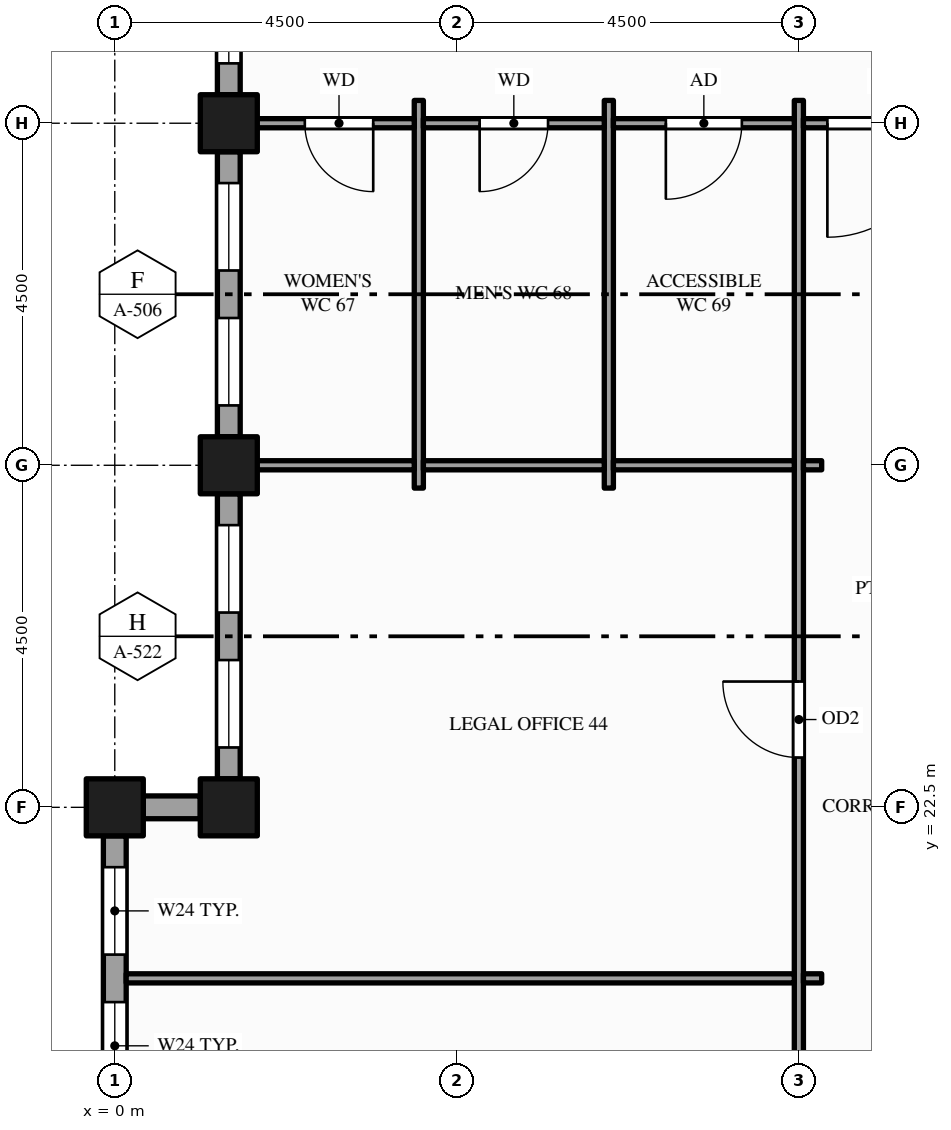
"""IFC4 building model, lengths in metres.
Left out: names, types, materials, properties, quantities, classifications, styles, units other than length and angle.
Written with IfcOpenShell. Run it as: python <this file> out.ifc"""

import sys

from ifc_helpers import new_model, si_unit, direction, frame, frame_2d, origin, origin_2d, place, context, subcontext, project, spatial, rectangle, hollow_rectangle, extrude, element, fill, save


model = new_model("IFC4")
c1 = context("Model", 3, precision=1e-05, world=origin(), true_north=direction((0.0, 1.0)))
c2 = subcontext(c1, "Body", "Model", "MODEL_VIEW")
j1 = project(units=[si_unit("LENGTHUNIT", "METRE"), si_unit("PLANEANGLEUNIT", "RADIAN")], contexts=[c1])
p1 = place(None, origin())
s1 = spatial("IfcSite", under=j1, at=p1, CompositionType="ELEMENT")
p2 = place(p1, origin())
s2 = spatial("IfcBuilding", under=s1, at=p2, CompositionType="ELEMENT")
p3 = place(p2, frame((0.0, 0.0, 239.0)))
s3 = spatial("IfcBuildingStorey", under=s2, at=p3, CompositionType="ELEMENT", Elevation=239.0)
for number, where, z_axis, x_axis in (
    (1, (0.0, 22.5, -0.15), (0.0, 0.0, 1.0), (1.0, 0.0, 0.0)),
    (2, (1.5, 22.5, -0.15), (0.0, 0.0, 1.0), (1.0, 0.0, 0.0)),
    (3, (1.5, 27.0, -0.15), (0.0, 0.0, 1.0), (1.0, 0.0, 0.0)),
    (4, (1.5, 31.5, -0.15), (0.0, 0.0, 1.0), (1.0, 0.0, 0.0)),
):
    element("IfcColumn", number, at=place(p3, frame(where, z_axis=z_axis, x_axis=x_axis)), inside=s3, PredefinedType="COLUMN", context=c2, shape_type="SweptSolid", body=[
        extrude(hollow_rectangle(XDim=0.75, YDim=0.75, WallThickness=0.036, at=origin_2d()), origin(), (0.0, 0.0, 1.0), 3.85),
    ])
p4 = place(p3, frame((1.5, 36.0, 0.0), z_axis=(0.0, 0.0, 1.0), x_axis=(0.0, -1.0, 0.0)))
e5 = element("IfcWall", 5, at=p4, inside=s3, PredefinedType="STANDARD", context=c2, shape_type="SweptSolid", body=[
    extrude(rectangle(XDim=4.125, YDim=0.3, at=frame_2d((2.062, 0.0))), origin(), (0.0, 0.0, 1.0), 3.007),
])
p5 = place(p4, frame((0.4, 0.0, 0.9)))
e6 = element("IfcOpeningElement", 6, at=p5, cuts=e5, PredefinedType="OPENING", context=c2, shape_type="SweptSolid", body=[
    extrude(rectangle(XDim=1.55, YDim=1.75, at=frame_2d((0.775, 0.875))), frame((0.0, 0.16, 0.0), z_axis=(0.0, -1.0, 0.0), x_axis=(1.0, 0.0, 0.0)), (0.0, 0.0, 1.0), 0.32),
])
p6 = place(p4, frame((2.562, 0.0, 0.9)))
e7 = element("IfcOpeningElement", 7, at=p6, cuts=e5, PredefinedType="OPENING", context=c2, shape_type="SweptSolid", body=[
    extrude(rectangle(XDim=1.15, YDim=1.75, at=frame_2d((0.575, 0.875))), frame((0.0, 0.16, 0.0), z_axis=(0.0, -1.0, 0.0), x_axis=(1.0, 0.0, 0.0)), (0.0, 0.0, 1.0), 0.32),
])
p7 = place(p3, frame((1.5, 31.125, 0.0), z_axis=(0.0, 0.0, 1.0), x_axis=(0.0, -1.0, 0.0)))
e8 = element("IfcWall", 8, at=p7, inside=s3, PredefinedType="STANDARD", context=c2, shape_type="SweptSolid", body=[
    extrude(rectangle(XDim=3.75, YDim=0.3, at=frame_2d((1.875, 0.0))), origin(), (0.0, 0.0, 1.0), 3.007),
])
p8 = place(p7, frame((0.413, 0.0, 0.9)))
e9 = element("IfcOpeningElement", 9, at=p8, cuts=e8, PredefinedType="OPENING", context=c2, shape_type="SweptSolid", body=[
    extrude(rectangle(XDim=1.15, YDim=1.75, at=frame_2d((0.575, 0.875))), frame((0.0, 0.16, 0.0), z_axis=(0.0, -1.0, 0.0), x_axis=(1.0, 0.0, 0.0)), (0.0, 0.0, 1.0), 0.32),
])
p9 = place(p7, frame((2.188, 0.0, 0.9)))
e10 = element("IfcOpeningElement", 10, at=p9, cuts=e8, PredefinedType="OPENING", context=c2, shape_type="SweptSolid", body=[
    extrude(rectangle(XDim=1.15, YDim=1.75, at=frame_2d((0.575, 0.875))), frame((0.0, 0.16, 0.0), z_axis=(0.0, -1.0, 0.0), x_axis=(1.0, 0.0, 0.0)), (0.0, 0.0, 1.0), 0.32),
])
p10 = place(p3, frame((1.5, 26.625, 0.0), z_axis=(0.0, 0.0, 1.0), x_axis=(0.0, -1.0, 0.0)))
e11 = element("IfcWall", 11, at=p10, inside=s3, PredefinedType="STANDARD", context=c2, shape_type="SweptSolid", body=[
    extrude(rectangle(XDim=3.75, YDim=0.3, at=frame_2d((1.875, 0.0))), origin(), (0.0, 0.0, 1.0), 3.007),
])
p11 = place(p10, frame((0.413, 0.0, 0.9)))
e12 = element("IfcOpeningElement", 12, at=p11, cuts=e11, PredefinedType="OPENING", context=c2, shape_type="SweptSolid", body=[
    extrude(rectangle(XDim=1.15, YDim=1.75, at=frame_2d((0.575, 0.875))), frame((0.0, 0.16, 0.0), z_axis=(0.0, -1.0, 0.0), x_axis=(1.0, 0.0, 0.0)), (0.0, 0.0, 1.0), 0.32),
])
p12 = place(p10, frame((2.188, 0.0, 0.9)))
e13 = element("IfcOpeningElement", 13, at=p12, cuts=e11, PredefinedType="OPENING", context=c2, shape_type="SweptSolid", body=[
    extrude(rectangle(XDim=1.15, YDim=1.75, at=frame_2d((0.575, 0.875))), frame((0.0, 0.16, 0.0), z_axis=(0.0, -1.0, 0.0), x_axis=(1.0, 0.0, 0.0)), (0.0, 0.0, 1.0), 0.32),
])
p13 = place(p3, frame((1.125, 22.5, 0.0), z_axis=(0.0, 0.0, 1.0), x_axis=(-1.0, 0.0, 0.0)))
e14 = element("IfcWall", 14, at=p13, inside=s3, PredefinedType="STANDARD", context=c2, shape_type="SweptSolid", body=[
    extrude(rectangle(XDim=0.75, YDim=0.3, at=frame_2d((0.375, 0.0))), origin(), (0.0, 0.0, 1.0), 3.057),
])
p14 = place(p3, frame((0.0, 22.125, 0.0), z_axis=(0.0, 0.0, 1.0), x_axis=(0.0, -1.0, 0.0)))
e15 = element("IfcWall", 15, at=p14, inside=s3, PredefinedType="STANDARD", context=c2, shape_type="SweptSolid", body=[
    extrude(rectangle(XDim=3.75, YDim=0.3, at=frame_2d((1.875, 0.0))), origin(), (0.0, 0.0, 1.0), 3.057),
])
p15 = place(p14, frame((0.413, 0.0, 0.9)))
e16 = element("IfcOpeningElement", 16, at=p15, cuts=e15, PredefinedType="OPENING", context=c2, shape_type="SweptSolid", body=[
    extrude(rectangle(XDim=1.15, YDim=2.0, at=frame_2d((0.575, 1.0))), frame((0.0, 0.16, 0.0), z_axis=(0.0, -1.0, 0.0), x_axis=(1.0, 0.0, 0.0)), (0.0, 0.0, 1.0), 0.32),
])
p16 = place(p14, frame((2.188, 0.0, 0.9)))
e17 = element("IfcOpeningElement", 17, at=p16, cuts=e15, PredefinedType="OPENING", context=c2, shape_type="SweptSolid", body=[
    extrude(rectangle(XDim=1.15, YDim=2.0, at=frame_2d((0.575, 1.0))), frame((0.0, 0.16, 0.0), z_axis=(0.0, -1.0, 0.0), x_axis=(1.0, 0.0, 0.0)), (0.0, 0.0, 1.0), 0.32),
])
for number, where, z_axis, x_axis in (
    (18, (4.0, 26.7, 0.0), (0.0, 0.0, 1.0), (0.0, 1.0, 0.0)),
    (19, (6.5, 26.7, 0.0), (0.0, 0.0, 1.0), (0.0, 1.0, 0.0)),
):
    element("IfcWall", number, at=place(p3, frame(where, z_axis=z_axis, x_axis=x_axis)), inside=s3, PredefinedType="PARTITIONING", context=c2, shape_type="SweptSolid", body=[
        extrude(rectangle(XDim=5.1, YDim=0.12, at=frame_2d((2.55, 0.0))), origin(), (0.0, 0.0, 1.0), 3.7),
    ])
p17 = place(p3, frame((9.0, 13.2, 0.0), z_axis=(0.0, 0.0, 1.0), x_axis=(0.0, 1.0, 0.0)))
e20 = element("IfcWall", 20, at=p17, inside=s3, PredefinedType="PARTITIONING", context=c2, shape_type="SweptSolid", body=[
    extrude(rectangle(XDim=18.6, YDim=0.12, at=frame_2d((9.3, 0.0))), origin(), (0.0, 0.0, 1.0), 2.72),
])
p18 = place(p17, frame((3.175, 0.0, 0.0)))
e21 = element("IfcOpeningElement", 21, at=p18, cuts=e20, PredefinedType="OPENING", context=c2, shape_type="SweptSolid", body=[
    extrude(rectangle(XDim=1.0, YDim=2.1, at=frame_2d((0.5, 1.05))), frame((0.0, 0.07, 0.0), z_axis=(0.0, -1.0, 0.0), x_axis=(1.0, 0.0, 0.0)), (0.0, 0.0, 1.0), 0.14),
])
p19 = place(p17, frame((9.955, 0.0, 0.0)))
e22 = element("IfcOpeningElement", 22, at=p19, cuts=e20, PredefinedType="OPENING", context=c2, shape_type="SweptSolid", body=[
    extrude(rectangle(XDim=1.0, YDim=2.1, at=frame_2d((0.5, 1.05))), frame((0.0, 0.07, 0.0), z_axis=(0.0, -1.0, 0.0), x_axis=(1.0, 0.0, 0.0)), (0.0, 0.0, 1.0), 0.14),
])
p20 = place(p3, frame((0.15, 20.25, 0.0), z_axis=(0.0, 0.0, 1.0), x_axis=(1.0, 0.0, 0.0)))
e23 = element("IfcWall", 23, at=p20, inside=s3, PredefinedType="PARTITIONING", context=c2, shape_type="SweptSolid", body=[
    extrude(rectangle(XDim=8.79, YDim=0.12, at=frame_2d((4.395, 0.0))), origin(), (0.0, 0.0, 1.0), 2.77),
])
p21 = place(p3, frame((9.06, 20.25, 0.0), z_axis=(0.0, 0.0, 1.0), x_axis=(1.0, 0.0, 0.0)))
e24 = element("IfcWall", 24, at=p21, inside=s3, PredefinedType="PARTITIONING", context=c2, shape_type="SweptSolid", body=[
    extrude(rectangle(XDim=0.24, YDim=0.12, at=frame_2d((0.12, 0.0))), origin(), (0.0, 0.0, 1.0), 2.77),
])
p22 = place(p3, frame((1.65, 27.0, 0.0), z_axis=(0.0, 0.0, 1.0), x_axis=(1.0, 0.0, 0.0)))
e25 = element("IfcWall", 25, at=p22, inside=s3, PredefinedType="PARTITIONING", context=c2, shape_type="SweptSolid", body=[
    extrude(rectangle(XDim=2.29, YDim=0.12, at=frame_2d((1.145, 0.0))), origin(), (0.0, 0.0, 1.0), 2.72),
])
for number, where, z_axis, x_axis in (
    (26, (4.06, 27.0, 0.0), (0.0, 0.0, 1.0), (1.0, 0.0, 0.0)),
    (27, (6.56, 27.0, 0.0), (0.0, 0.0, 1.0), (1.0, 0.0, 0.0)),
):
    element("IfcWall", number, at=place(p3, frame(where, z_axis=z_axis, x_axis=x_axis)), inside=s3, PredefinedType="PARTITIONING", context=c2, shape_type="SweptSolid", body=[
        extrude(rectangle(XDim=2.38, YDim=0.12, at=frame_2d((1.19, 0.0))), origin(), (0.0, 0.0, 1.0), 2.72),
    ])
p23 = place(p3, frame((9.06, 27.0, 0.0), z_axis=(0.0, 0.0, 1.0), x_axis=(1.0, 0.0, 0.0)))
e28 = element("IfcWall", 28, at=p23, inside=s3, PredefinedType="PARTITIONING", context=c2, shape_type="SweptSolid", body=[
    extrude(rectangle(XDim=0.24, YDim=0.12, at=frame_2d((0.12, 0.0))), origin(), (0.0, 0.0, 1.0), 2.72),
])
p24 = place(p3, frame((1.65, 31.5, 0.0), z_axis=(0.0, 0.0, 1.0), x_axis=(1.0, 0.0, 0.0)))
e29 = element("IfcWall", 29, at=p24, inside=s3, PredefinedType="PARTITIONING", context=c2, shape_type="SweptSolid", body=[
    extrude(rectangle(XDim=2.29, YDim=0.12, at=frame_2d((1.145, 0.0))), origin(), (0.0, 0.0, 1.0), 2.72),
])
p25 = place(p24, frame((0.85, 0.0, 0.0)))
e30 = element("IfcOpeningElement", 30, at=p25, cuts=e29, PredefinedType="OPENING", context=c2, shape_type="SweptSolid", body=[
    extrude(rectangle(XDim=0.9, YDim=2.1, at=frame_2d((0.45, 1.05))), frame((0.0, 0.07, 0.0), z_axis=(0.0, -1.0, 0.0), x_axis=(1.0, 0.0, 0.0)), (0.0, 0.0, 1.0), 0.14),
])
p26 = place(p3, frame((4.06, 31.5, 0.0), z_axis=(0.0, 0.0, 1.0), x_axis=(1.0, 0.0, 0.0)))
e31 = element("IfcWall", 31, at=p26, inside=s3, PredefinedType="PARTITIONING", context=c2, shape_type="SweptSolid", body=[
    extrude(rectangle(XDim=2.38, YDim=0.12, at=frame_2d((1.19, 0.0))), origin(), (0.0, 0.0, 1.0), 2.72),
])
p27 = place(p26, frame((0.74, 0.0, 0.0)))
e32 = element("IfcOpeningElement", 32, at=p27, cuts=e31, PredefinedType="OPENING", context=c2, shape_type="SweptSolid", body=[
    extrude(rectangle(XDim=0.9, YDim=2.1, at=frame_2d((0.45, 1.05))), frame((0.0, 0.07, 0.0), z_axis=(0.0, -1.0, 0.0), x_axis=(1.0, 0.0, 0.0)), (0.0, 0.0, 1.0), 0.14),
])
p28 = place(p3, frame((6.56, 31.5, 0.0), z_axis=(0.0, 0.0, 1.0), x_axis=(1.0, 0.0, 0.0)))
e33 = element("IfcWall", 33, at=p28, inside=s3, PredefinedType="PARTITIONING", context=c2, shape_type="SweptSolid", body=[
    extrude(rectangle(XDim=2.38, YDim=0.12, at=frame_2d((1.19, 0.0))), origin(), (0.0, 0.0, 1.0), 2.72),
])
p29 = place(p28, frame((0.69, 0.0, 0.0)))
e34 = element("IfcOpeningElement", 34, at=p29, cuts=e33, PredefinedType="OPENING", context=c2, shape_type="SweptSolid", body=[
    extrude(rectangle(XDim=1.0, YDim=2.1, at=frame_2d((0.5, 1.05))), frame((0.0, 0.07, 0.0), z_axis=(0.0, -1.0, 0.0), x_axis=(1.0, 0.0, 0.0)), (0.0, 0.0, 1.0), 0.14),
])
p30 = place(p3, frame((9.06, 31.5, 0.0), z_axis=(0.0, 0.0, 1.0), x_axis=(1.0, 0.0, 0.0)))
e35 = element("IfcWall", 35, at=p30, inside=s3, PredefinedType="PARTITIONING", context=c2, shape_type="SweptSolid", body=[
    extrude(rectangle(XDim=2.13, YDim=0.12, at=frame_2d((1.065, 0.0))), origin(), (0.0, 0.0, 1.0), 2.72),
])
p31 = place(p30, frame((0.315, 0.0, 0.0)))
e36 = element("IfcOpeningElement", 36, at=p31, cuts=e35, PredefinedType="OPENING", context=c2, shape_type="SweptSolid", body=[
    extrude(rectangle(XDim=1.5, YDim=2.1, at=frame_2d((0.75, 1.05))), frame((0.0, 0.07, 0.0), z_axis=(0.0, -1.0, 0.0), x_axis=(1.0, 0.0, 0.0)), (0.0, 0.0, 1.0), 0.14),
])
p32 = place(p6, origin())
e37 = element("IfcWindow", 37, at=p32, inside=s3, PartitioningType="SINGLE_PANEL", PredefinedType="WINDOW", context=c2, shape_type="SweptSolid", body=[
    extrude(rectangle(XDim=1.15, YDim=1.75, at=frame_2d((0.575, 0.875))), frame((0.0, 0.03, 0.0), z_axis=(0.0, -1.0, 0.0), x_axis=(1.0, 0.0, 0.0)), (0.0, 0.0, 1.0), 0.06),
])
fill(e7, e37)
p33 = place(p8, origin())
e38 = element("IfcWindow", 38, at=p33, inside=s3, PartitioningType="SINGLE_PANEL", PredefinedType="WINDOW", context=c2, shape_type="SweptSolid", body=[
    extrude(rectangle(XDim=1.15, YDim=1.75, at=frame_2d((0.575, 0.875))), frame((0.0, 0.03, 0.0), z_axis=(0.0, -1.0, 0.0), x_axis=(1.0, 0.0, 0.0)), (0.0, 0.0, 1.0), 0.06),
])
fill(e9, e38)
p34 = place(p9, origin())
e39 = element("IfcWindow", 39, at=p34, inside=s3, PartitioningType="SINGLE_PANEL", PredefinedType="WINDOW", context=c2, shape_type="SweptSolid", body=[
    extrude(rectangle(XDim=1.15, YDim=1.75, at=frame_2d((0.575, 0.875))), frame((0.0, 0.03, 0.0), z_axis=(0.0, -1.0, 0.0), x_axis=(1.0, 0.0, 0.0)), (0.0, 0.0, 1.0), 0.06),
])
fill(e10, e39)
p35 = place(p11, origin())
e40 = element("IfcWindow", 40, at=p35, inside=s3, PartitioningType="SINGLE_PANEL", PredefinedType="WINDOW", context=c2, shape_type="SweptSolid", body=[
    extrude(rectangle(XDim=1.15, YDim=1.75, at=frame_2d((0.575, 0.875))), frame((0.0, 0.03, 0.0), z_axis=(0.0, -1.0, 0.0), x_axis=(1.0, 0.0, 0.0)), (0.0, 0.0, 1.0), 0.06),
])
fill(e12, e40)
p36 = place(p12, origin())
e41 = element("IfcWindow", 41, at=p36, inside=s3, PartitioningType="SINGLE_PANEL", PredefinedType="WINDOW", context=c2, shape_type="SweptSolid", body=[
    extrude(rectangle(XDim=1.15, YDim=1.75, at=frame_2d((0.575, 0.875))), frame((0.0, 0.03, 0.0), z_axis=(0.0, -1.0, 0.0), x_axis=(1.0, 0.0, 0.0)), (0.0, 0.0, 1.0), 0.06),
])
fill(e13, e41)
p37 = place(p15, origin())
e42 = element("IfcWindow", 42, at=p37, inside=s3, PartitioningType="SINGLE_PANEL", PredefinedType="WINDOW", context=c2, shape_type="SweptSolid", body=[
    extrude(rectangle(XDim=1.15, YDim=2.0, at=frame_2d((0.575, 1.0))), frame((0.0, 0.03, 0.0), z_axis=(0.0, -1.0, 0.0), x_axis=(1.0, 0.0, 0.0)), (0.0, 0.0, 1.0), 0.06),
])
fill(e16, e42)
p38 = place(p16, origin())
e43 = element("IfcWindow", 43, at=p38, inside=s3, PartitioningType="SINGLE_PANEL", PredefinedType="WINDOW", context=c2, shape_type="SweptSolid", body=[
    extrude(rectangle(XDim=1.15, YDim=2.0, at=frame_2d((0.575, 1.0))), frame((0.0, 0.03, 0.0), z_axis=(0.0, -1.0, 0.0), x_axis=(1.0, 0.0, 0.0)), (0.0, 0.0, 1.0), 0.06),
])
fill(e17, e43)
p39 = place(p31, origin())
e44 = element("IfcDoor", 44, at=p39, inside=s3, OperationType="SINGLE_SWING_LEFT", PredefinedType="DOOR", context=c2, shape_type="SweptSolid", body=[
    extrude(rectangle(XDim=1.5, YDim=2.1, at=frame_2d((0.75, 1.05))), frame((0.0, 0.025, 0.0), z_axis=(0.0, -1.0, 0.0), x_axis=(1.0, 0.0, 0.0)), (0.0, 0.0, 1.0), 0.05),
])
fill(e36, e44)
p40 = place(p19, origin())
e45 = element("IfcDoor", 45, at=p40, inside=s3, OperationType="SINGLE_SWING_RIGHT", PredefinedType="DOOR", context=c2, shape_type="SweptSolid", body=[
    extrude(rectangle(XDim=1.0, YDim=2.1, at=frame_2d((0.5, 1.05))), frame((0.0, 0.025, 0.0), z_axis=(0.0, -1.0, 0.0), x_axis=(1.0, 0.0, 0.0)), (0.0, 0.0, 1.0), 0.05),
])
fill(e22, e45)
p41 = place(p25, origin())
e46 = element("IfcDoor", 46, at=p41, inside=s3, OperationType="SINGLE_SWING_RIGHT", PredefinedType="DOOR", context=c2, shape_type="SweptSolid", body=[
    extrude(rectangle(XDim=0.9, YDim=2.1, at=frame_2d((0.45, 1.05))), frame((0.0, 0.025, 0.0), z_axis=(0.0, -1.0, 0.0), x_axis=(1.0, 0.0, 0.0)), (0.0, 0.0, 1.0), 0.05),
])
fill(e30, e46)
p42 = place(p27, origin())
e47 = element("IfcDoor", 47, at=p42, inside=s3, OperationType="SINGLE_SWING_LEFT", PredefinedType="DOOR", context=c2, shape_type="SweptSolid", body=[
    extrude(rectangle(XDim=0.9, YDim=2.1, at=frame_2d((0.45, 1.05))), frame((0.0, 0.025, 0.0), z_axis=(0.0, -1.0, 0.0), x_axis=(1.0, 0.0, 0.0)), (0.0, 0.0, 1.0), 0.05),
])
fill(e32, e47)
p43 = place(p29, origin())
e48 = element("IfcDoor", 48, at=p43, inside=s3, OperationType="SINGLE_SWING_LEFT", PredefinedType="DOOR", context=c2, shape_type="SweptSolid", body=[
    extrude(rectangle(XDim=1.0, YDim=2.1, at=frame_2d((0.5, 1.05))), frame((0.0, 0.025, 0.0), z_axis=(0.0, -1.0, 0.0), x_axis=(1.0, 0.0, 0.0)), (0.0, 0.0, 1.0), 0.05),
])
fill(e34, e48)
save(model, sys.argv[1])
